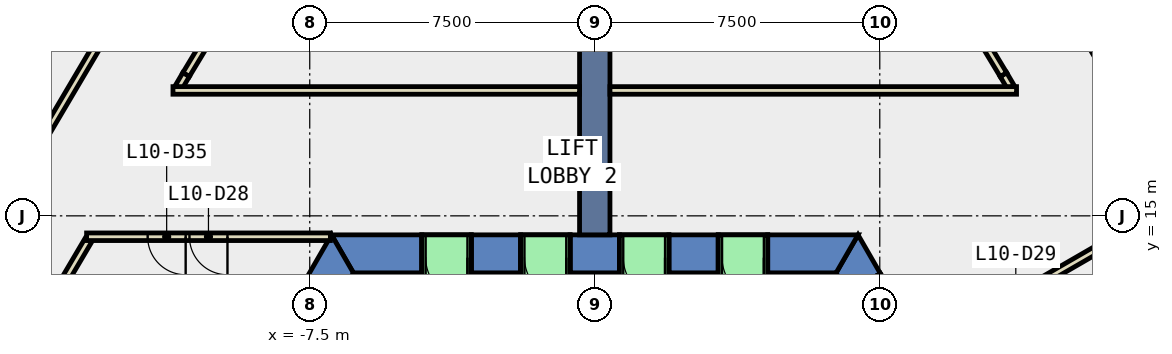
"""IFC4 building model, lengths in metres.
Left out: names, types, materials, properties, quantities, classifications, styles, units other than length and angle.
Written with IfcOpenShell. Run it as: python <this file> out.ifc"""

import sys

from ifc_helpers import new_model, si_unit, direction, frame, frame_2d, origin, place, context, subcontext, project, spatial, polyline, rectangle, outline, extrude, element, fill, save


model = new_model("IFC4")
c1 = context("Model", 3, precision=1e-05, world=origin(), true_north=direction((0.0, 1.0)))
c2 = subcontext(c1, "Body", "Model", "MODEL_VIEW")
j1 = project(units=[si_unit("LENGTHUNIT", "METRE"), si_unit("PLANEANGLEUNIT", "RADIAN")], contexts=[c1])
p1 = place(None, origin())
s1 = spatial("IfcSite", under=j1, at=p1, CompositionType="ELEMENT")
p2 = place(p1, origin())
s2 = spatial("IfcBuilding", under=s1, at=p2, CompositionType="ELEMENT")
p3 = place(p2, frame((0.0, 0.0, 51.8)))
s3 = spatial("IfcBuildingStorey", under=s2, at=p3, CompositionType="ELEMENT", Elevation=51.8)
p4 = place(p3, frame((0.0, 0.0, -0.4)))
e1 = element("IfcWall", 1, at=p4, inside=s3, PredefinedType="SHEAR", context=c2, shape_type="SweptSolid", body=[
    extrude(outline(polyline([(6.651, 12.98), (7.517, 13.48), (6.928, 14.5), (6.351, 13.5), (6.651, 12.98)])), origin(), (0.0, 0.0, 1.0), 4.2),
])
p5 = place(p3, frame((0.0, 0.0, 3.6)))
e2 = element("IfcWall", 2, at=p5, inside=s3, PredefinedType="SHEAR", context=c2, shape_type="SweptSolid", body=[
    extrude(outline(polyline([(7.517, 13.48), (6.651, 12.98), (7.651, 11.248), (8.517, 11.748), (7.517, 13.48)])), origin(), (0.0, 0.0, 1.0), 0.2),
])
p6 = place(p3, frame((0.0, 0.0, -0.4)))
e3 = element("IfcWall", 3, at=p6, inside=s3, PredefinedType="SHEAR", context=c2, shape_type="SweptSolid", body=[
    extrude(outline(polyline([(4.55, 14.5), (4.55, 13.5), (6.351, 13.5), (6.928, 14.5), (4.55, 14.5)])), origin(), (0.0, 0.0, 1.0), 4.2),
])
p7 = place(p3, frame((0.0, 0.0, -0.4)))
e4 = element("IfcWall", 4, at=p7, inside=s3, PredefinedType="SHEAR", context=c2, shape_type="SweptSolid", body=[
    extrude(outline(polyline([(1.95, 14.5), (1.95, 13.5), (3.25, 13.5), (3.25, 14.5), (1.95, 14.5)])), origin(), (0.0, 0.0, 1.0), 4.2),
])
p8 = place(p3, frame((0.0, 0.0, -0.4)))
e5 = element("IfcWall", 5, at=p8, inside=s3, PredefinedType="SHEAR", context=c2, shape_type="SweptSolid", body=[
    extrude(outline(polyline([(-0.65, 14.5), (-0.65, 13.5), (0.65, 13.5), (0.65, 14.5), (-0.65, 14.5)])), origin(), (0.0, 0.0, 1.0), 4.2),
])
p9 = place(p3, frame((0.0, 0.0, -0.4)))
e6 = element("IfcWall", 6, at=p9, inside=s3, PredefinedType="SHEAR", context=c2, shape_type="SweptSolid", body=[
    extrude(outline(polyline([(-3.25, 14.5), (-3.25, 13.5), (-1.95, 13.5), (-1.95, 14.5), (-3.25, 14.5)])), origin(), (0.0, 0.0, 1.0), 4.2),
])
p10 = place(p3, frame((0.0, 0.0, -0.4)))
e7 = element("IfcWall", 7, at=p10, inside=s3, PredefinedType="SHEAR", context=c2, shape_type="SweptSolid", body=[
    extrude(outline(polyline([(-4.55, 13.5), (-4.55, 14.5), (-6.928, 14.5), (-6.351, 13.5), (-4.55, 13.5)])), origin(), (0.0, 0.0, 1.0), 4.2),
])
p11 = place(p3, frame((0.0, 0.0, 3.6)))
e8 = element("IfcWall", 8, at=p11, inside=s3, PredefinedType="SHEAR", context=c2, shape_type="SweptSolid", body=[
    extrude(outline(polyline([(3.25, 14.5), (3.25, 13.5), (4.55, 13.5), (4.55, 14.5), (3.25, 14.5)])), origin(), (0.0, 0.0, 1.0), 0.2),
])
p12 = place(p3, frame((0.0, 0.0, 3.6)))
e9 = element("IfcWall", 9, at=p12, inside=s3, PredefinedType="SHEAR", context=c2, shape_type="SweptSolid", body=[
    extrude(outline(polyline([(0.65, 14.5), (0.65, 13.5), (1.95, 13.5), (1.95, 14.5), (0.65, 14.5)])), origin(), (0.0, 0.0, 1.0), 0.2),
])
p13 = place(p3, frame((0.0, 0.0, 3.6)))
e10 = element("IfcWall", 10, at=p13, inside=s3, PredefinedType="SHEAR", context=c2, shape_type="SweptSolid", body=[
    extrude(outline(polyline([(-1.95, 14.5), (-1.95, 13.5), (-0.65, 13.5), (-0.65, 14.5), (-1.95, 14.5)])), origin(), (0.0, 0.0, 1.0), 0.2),
])
p14 = place(p3, frame((0.0, 0.0, 3.6)))
e11 = element("IfcWall", 11, at=p14, inside=s3, PredefinedType="SHEAR", context=c2, shape_type="SweptSolid", body=[
    extrude(outline(polyline([(-4.55, 14.5), (-4.55, 13.5), (-3.25, 13.5), (-3.25, 14.5), (-4.55, 14.5)])), origin(), (0.0, 0.0, 1.0), 0.2),
])
p15 = place(p3, frame((0.0, 0.0, -0.4)))
e12 = element("IfcWall", 12, at=p15, inside=s3, PredefinedType="SHEAR", context=c2, shape_type="SweptSolid", body=[
    extrude(outline(polyline([(-12.267, 5.252), (-11.402, 4.752), (-6.351, 13.5), (-6.928, 14.5), (-12.267, 5.252)])), origin(), (0.0, 0.0, 1.0), 4.2),
])
p16 = place(p3, frame((0.0, 14.5, -0.4), z_axis=(0.0, 0.0, 1.0), x_axis=(0.0, 1.0, 0.0)))
e13 = element("IfcWall", 13, at=p16, inside=s3, PredefinedType="SHEAR", context=c2, shape_type="SweptSolid", body=[
    extrude(rectangle(XDim=9.0, YDim=0.8, at=frame_2d((4.5, 0.0))), origin(), (0.0, 0.0, 1.0), 4.2),
])
p17 = place(p3, frame((-13.323, 14.364, 0.0), z_axis=(0.0, 0.0, 1.0), x_axis=(-0.508274698505, -0.861195001646, 0.0)))
e14 = element("IfcWall", 14, at=p17, inside=s3, PredefinedType="PARTITIONING", context=c2, shape_type="SweptSolid", body=[
    extrude(rectangle(XDim=1.828, YDim=0.2, at=frame_2d((0.914, 0.0))), origin(), (0.0, 0.0, 1.0), 3.8),
])
p18 = place(p3, frame((13.492, 14.274, 0.0), z_axis=(0.0, 0.0, 1.0), x_axis=(-0.866003598361, -0.5000377662, 0.0)))
e15 = element("IfcWall", 15, at=p18, inside=s3, PredefinedType="PARTITIONING", context=c2, shape_type="SweptSolid", body=[
    extrude(rectangle(XDim=5.071, YDim=0.2, at=frame_2d((2.536, 0.0))), origin(), (0.0, 0.0, 1.0), 3.8),
])
p19 = place(p18, frame((2.286, 0.0, 0.0)))
e16 = element("IfcOpeningElement", 16, at=p19, cuts=e15, PredefinedType="OPENING", context=c2, shape_type="SweptSolid", body=[
    extrude(rectangle(XDim=1.0, YDim=2.1, at=frame_2d((0.5, 1.05))), frame((0.0, 0.11, 0.0), z_axis=(0.0, -1.0, 0.0), x_axis=(1.0, 0.0, 0.0)), (0.0, 0.0, 1.0), 0.22),
])
p20 = place(p3, frame((10.948, 18.386, 0.0), z_axis=(0.0, 0.0, 1.0), x_axis=(-0.506880801681, 0.862016155815, 0.0)))
e17 = element("IfcWall", 17, at=p20, inside=s3, PredefinedType="PARTITIONING", context=c2, shape_type="SweptSolid", body=[
    extrude(rectangle(XDim=0.383, YDim=0.2, at=frame_2d((0.191, 0.0))), origin(), (0.0, 0.0, 1.0), 3.8),
])
p21 = place(p3, frame((10.754, 18.716, 0.0), z_axis=(0.0, 0.0, 1.0), x_axis=(-0.516755973305, 0.856132737403, 0.0)))
e18 = element("IfcWall", 18, at=p21, inside=s3, PredefinedType="PARTITIONING", context=c2, shape_type="SweptSolid", body=[
    extrude(rectangle(XDim=7.222, YDim=0.2, at=frame_2d((3.611, 0.0))), origin(), (0.0, 0.0, 1.0), 3.8),
])
p22 = place(p21, frame((3.111, 0.0, 0.0)))
e19 = element("IfcOpeningElement", 19, at=p22, cuts=e18, PredefinedType="OPENING", context=c2, shape_type="SweptSolid", body=[
    extrude(rectangle(XDim=1.0, YDim=2.1, at=frame_2d((0.5, 1.05))), frame((0.0, 0.11, 0.0), z_axis=(0.0, -1.0, 0.0), x_axis=(1.0, 0.0, 0.0)), (0.0, 0.0, 1.0), 0.22),
])
p23 = place(p3, frame((-7.022, 24.899, 0.0), z_axis=(0.0, 0.0, 1.0), x_axis=(-0.516755973305, -0.856132737403, 0.0)))
e20 = element("IfcWall", 20, at=p23, inside=s3, PredefinedType="PARTITIONING", context=c2, shape_type="SweptSolid", body=[
    extrude(rectangle(XDim=7.222, YDim=0.2, at=frame_2d((3.611, 0.0))), origin(), (0.0, 0.0, 1.0), 3.8),
])
p24 = place(p23, frame((3.111, 0.0, 0.0)))
e21 = element("IfcOpeningElement", 21, at=p24, cuts=e20, PredefinedType="OPENING", context=c2, shape_type="SweptSolid", body=[
    extrude(rectangle(XDim=1.0, YDim=2.1, at=frame_2d((0.5, 1.05))), frame((0.0, 0.11, 0.0), z_axis=(0.0, -1.0, 0.0), x_axis=(1.0, 0.0, 0.0)), (0.0, 0.0, 1.0), 0.22),
])
p25 = place(p3, frame((-10.754, 18.716, 0.0), z_axis=(0.0, 0.0, 1.0), x_axis=(-0.506880801681, -0.862016155815, 0.0)))
e22 = element("IfcWall", 22, at=p25, inside=s3, PredefinedType="PARTITIONING", context=c2, shape_type="SweptSolid", body=[
    extrude(rectangle(XDim=0.383, YDim=0.2, at=frame_2d((0.191, 0.0))), origin(), (0.0, 0.0, 1.0), 3.8),
])
p26 = place(p3, frame((12.815, 19.946, 0.0), z_axis=(0.0, 0.0, 1.0), x_axis=(0.508287536166, -0.861187424768, 0.0)))
e23 = element("IfcWall", 23, at=p26, inside=s3, PredefinedType="PARTITIONING", context=c2, shape_type="SweptSolid", body=[
    extrude(rectangle(XDim=7.169, YDim=0.2, at=frame_2d((3.584, 0.0))), origin(), (0.0, 0.0, 1.0), 3.8),
])
p27 = place(p3, frame((-14.618, 16.891, 0.0), z_axis=(0.0, 0.0, 1.0), x_axis=(0.508267810274, 0.861199067022, 0.0)))
e24 = element("IfcWall", 24, at=p27, inside=s3, PredefinedType="PARTITIONING", context=c2, shape_type="SweptSolid", body=[
    extrude(rectangle(XDim=3.547, YDim=0.2, at=frame_2d((1.774, 0.0))), origin(), (0.0, 0.0, 1.0), 3.8),
])
p28 = place(p3, frame((-6.957, 14.45, 0.0), z_axis=(0.0, 0.0, 1.0), x_axis=(-1.0, 0.0, 0.0)))
e25 = element("IfcWall", 25, at=p28, inside=s3, PredefinedType="PARTITIONING", context=c2, shape_type="SweptSolid", body=[
    extrude(rectangle(XDim=6.415, YDim=0.2, at=frame_2d((3.208, 0.0))), origin(), (0.0, 0.0, 1.0), 3.8),
])
p29 = place(p28, frame((2.708, 0.0, 0.0)))
e26 = element("IfcOpeningElement", 26, at=p29, cuts=e25, PredefinedType="OPENING", context=c2, shape_type="SweptSolid", body=[
    extrude(rectangle(XDim=1.0, YDim=2.1, at=frame_2d((0.5, 1.05))), frame((0.0, 0.11, 0.0), z_axis=(0.0, -1.0, 0.0), x_axis=(1.0, 0.0, 0.0)), (0.0, 0.0, 1.0), 0.22),
])
p30 = place(p28, frame((3.808, 0.0, 0.0)))
e27 = element("IfcOpeningElement", 27, at=p30, cuts=e25, PredefinedType="OPENING", context=c2, shape_type="SweptSolid", body=[
    extrude(rectangle(XDim=1.0, YDim=2.1, at=frame_2d((0.5, 1.05))), frame((0.0, 0.11, 0.0), z_axis=(0.0, -1.0, 0.0), x_axis=(1.0, 0.0, 0.0)), (0.0, 0.0, 1.0), 0.22),
])
for number, where, z_axis, x_axis in (
    (28, (0.4, 18.3, 0.0), (0.0, 0.0, 1.0), (1.0, 0.0, 0.0)),
    (29, (-11.099, 18.3, 0.0), (0.0, 0.0, 1.0), (1.0, 0.0, 0.0)),
):
    element("IfcWall", number, at=place(p3, frame(where, z_axis=z_axis, x_axis=x_axis)), inside=s3, PredefinedType="PARTITIONING", context=c2, shape_type="SweptSolid", body=[
        extrude(rectangle(XDim=10.699, YDim=0.2, at=frame_2d((5.35, 0.0))), origin(), (0.0, 0.0, 1.0), 3.8),
    ])
p31 = place(p3, frame((8.43, 11.698, 0.0), z_axis=(0.0, 0.0, 1.0), x_axis=(-0.50002537861, 0.866010750942, 0.0)))
e30 = element("IfcWall", 30, at=p31, inside=s3, PredefinedType="PARTITIONING", context=c2, shape_type="SweptSolid", body=[
    extrude(rectangle(XDim=2.0, YDim=0.2, at=frame_2d((1.0, 0.0))), origin(), (0.0, 0.0, 1.0), 2.4),
])
p32 = place(p31, frame((0.19, 0.0, 0.0)))
e31 = element("IfcOpeningElement", 31, at=p32, cuts=e30, PredefinedType="OPENING", context=c2, shape_type="SweptSolid", body=[
    extrude(rectangle(XDim=1.8, YDim=2.1, at=frame_2d((0.9, 1.05))), frame((0.0, 0.11, 0.0), z_axis=(0.0, -1.0, 0.0), x_axis=(1.0, 0.0, 0.0)), (0.0, 0.0, 1.0), 0.22),
])
p33 = place(p3, frame((4.55, 13.9, 0.0), z_axis=(0.0, 0.0, 1.0), x_axis=(-1.0, 0.0, 0.0)))
e32 = element("IfcWall", 32, at=p33, inside=s3, PredefinedType="STANDARD", context=c2, shape_type="SweptSolid", body=[
    extrude(rectangle(XDim=1.3, YDim=1.2, at=frame_2d((0.65, 0.0))), origin(), (0.0, 0.0, 1.0), 2.4),
])
p34 = place(p33, frame((0.1, 0.0, 0.0)))
e33 = element("IfcOpeningElement", 33, at=p34, cuts=e32, PredefinedType="OPENING", context=c2, shape_type="SweptSolid", body=[
    extrude(rectangle(XDim=1.1, YDim=2.3, at=frame_2d((0.55, 1.15))), frame((0.0, 0.61, 0.0), z_axis=(0.0, -1.0, 0.0), x_axis=(1.0, 0.0, 0.0)), (0.0, 0.0, 1.0), 1.22),
])
p35 = place(p3, frame((1.95, 13.9, 0.0), z_axis=(0.0, 0.0, 1.0), x_axis=(-1.0, 0.0, 0.0)))
e34 = element("IfcWall", 34, at=p35, inside=s3, PredefinedType="STANDARD", context=c2, shape_type="SweptSolid", body=[
    extrude(rectangle(XDim=1.3, YDim=1.2, at=frame_2d((0.65, 0.0))), origin(), (0.0, 0.0, 1.0), 2.4),
])
p36 = place(p35, frame((0.1, 0.0, 0.0)))
e35 = element("IfcOpeningElement", 35, at=p36, cuts=e34, PredefinedType="OPENING", context=c2, shape_type="SweptSolid", body=[
    extrude(rectangle(XDim=1.1, YDim=2.3, at=frame_2d((0.55, 1.15))), frame((0.0, 0.61, 0.0), z_axis=(0.0, -1.0, 0.0), x_axis=(1.0, 0.0, 0.0)), (0.0, 0.0, 1.0), 1.22),
])
p37 = place(p3, frame((-0.65, 13.9, 0.0), z_axis=(0.0, 0.0, 1.0), x_axis=(-1.0, 0.0, 0.0)))
e36 = element("IfcWall", 36, at=p37, inside=s3, PredefinedType="STANDARD", context=c2, shape_type="SweptSolid", body=[
    extrude(rectangle(XDim=1.3, YDim=1.2, at=frame_2d((0.65, 0.0))), origin(), (0.0, 0.0, 1.0), 2.4),
])
p38 = place(p37, frame((0.1, 0.0, 0.0)))
e37 = element("IfcOpeningElement", 37, at=p38, cuts=e36, PredefinedType="OPENING", context=c2, shape_type="SweptSolid", body=[
    extrude(rectangle(XDim=1.1, YDim=2.3, at=frame_2d((0.55, 1.15))), frame((0.0, 0.61, 0.0), z_axis=(0.0, -1.0, 0.0), x_axis=(1.0, 0.0, 0.0)), (0.0, 0.0, 1.0), 1.22),
])
p39 = place(p3, frame((-3.25, 13.9, 0.0), z_axis=(0.0, 0.0, 1.0), x_axis=(-1.0, 0.0, 0.0)))
e38 = element("IfcWall", 38, at=p39, inside=s3, PredefinedType="STANDARD", context=c2, shape_type="SweptSolid", body=[
    extrude(rectangle(XDim=1.3, YDim=1.2, at=frame_2d((0.65, 0.0))), origin(), (0.0, 0.0, 1.0), 2.4),
])
p40 = place(p39, frame((0.1, 0.0, 0.0)))
e39 = element("IfcOpeningElement", 39, at=p40, cuts=e38, PredefinedType="OPENING", context=c2, shape_type="SweptSolid", body=[
    extrude(rectangle(XDim=1.1, YDim=2.3, at=frame_2d((0.55, 1.15))), frame((0.0, 0.61, 0.0), z_axis=(0.0, -1.0, 0.0), x_axis=(1.0, 0.0, 0.0)), (0.0, 0.0, 1.0), 1.22),
])
p41 = place(p29, origin())
e40 = element("IfcDoor", 40, at=p41, inside=s3, OperationType="SINGLE_SWING_LEFT", PredefinedType="DOOR", context=c2, shape_type="SweptSolid", body=[
    extrude(rectangle(XDim=1.0, YDim=2.1, at=frame_2d((0.5, 1.05))), frame((0.0, 0.025, 0.0), z_axis=(0.0, -1.0, 0.0), x_axis=(1.0, 0.0, 0.0)), (0.0, 0.0, 1.0), 0.05),
])
fill(e26, e40)
p42 = place(p30, origin())
e41 = element("IfcDoor", 41, at=p42, inside=s3, OperationType="SINGLE_SWING_RIGHT", PredefinedType="DOOR", context=c2, shape_type="SweptSolid", body=[
    extrude(rectangle(XDim=1.0, YDim=2.1, at=frame_2d((0.5, 1.05))), frame((0.0, 0.025, 0.0), z_axis=(0.0, -1.0, 0.0), x_axis=(1.0, 0.0, 0.0)), (0.0, 0.0, 1.0), 0.05),
])
fill(e27, e41)
p43 = place(p34, origin())
e42 = element("IfcDoor", 42, at=p43, inside=s3, OperationType="SLIDING_TO_LEFT", PredefinedType="DOOR", context=c2, shape_type="SweptSolid", body=[
    extrude(rectangle(XDim=1.1, YDim=2.3, at=frame_2d((0.55, 1.15))), frame((0.0, 0.025, 0.0), z_axis=(0.0, -1.0, 0.0), x_axis=(1.0, 0.0, 0.0)), (0.0, 0.0, 1.0), 0.05),
])
fill(e33, e42)
p44 = place(p36, origin())
e43 = element("IfcDoor", 43, at=p44, inside=s3, OperationType="SLIDING_TO_LEFT", PredefinedType="DOOR", context=c2, shape_type="SweptSolid", body=[
    extrude(rectangle(XDim=1.1, YDim=2.3, at=frame_2d((0.55, 1.15))), frame((0.0, 0.025, 0.0), z_axis=(0.0, -1.0, 0.0), x_axis=(1.0, 0.0, 0.0)), (0.0, 0.0, 1.0), 0.05),
])
fill(e35, e43)
p45 = place(p38, origin())
e44 = element("IfcDoor", 44, at=p45, inside=s3, OperationType="SLIDING_TO_LEFT", PredefinedType="DOOR", context=c2, shape_type="SweptSolid", body=[
    extrude(rectangle(XDim=1.1, YDim=2.3, at=frame_2d((0.55, 1.15))), frame((0.0, 0.025, 0.0), z_axis=(0.0, -1.0, 0.0), x_axis=(1.0, 0.0, 0.0)), (0.0, 0.0, 1.0), 0.05),
])
fill(e37, e44)
p46 = place(p40, origin())
e45 = element("IfcDoor", 45, at=p46, inside=s3, OperationType="SLIDING_TO_LEFT", PredefinedType="DOOR", context=c2, shape_type="SweptSolid", body=[
    extrude(rectangle(XDim=1.1, YDim=2.3, at=frame_2d((0.55, 1.15))), frame((0.0, 0.025, 0.0), z_axis=(0.0, -1.0, 0.0), x_axis=(1.0, 0.0, 0.0)), (0.0, 0.0, 1.0), 0.05),
])
fill(e39, e45)
save(model, sys.argv[1])
